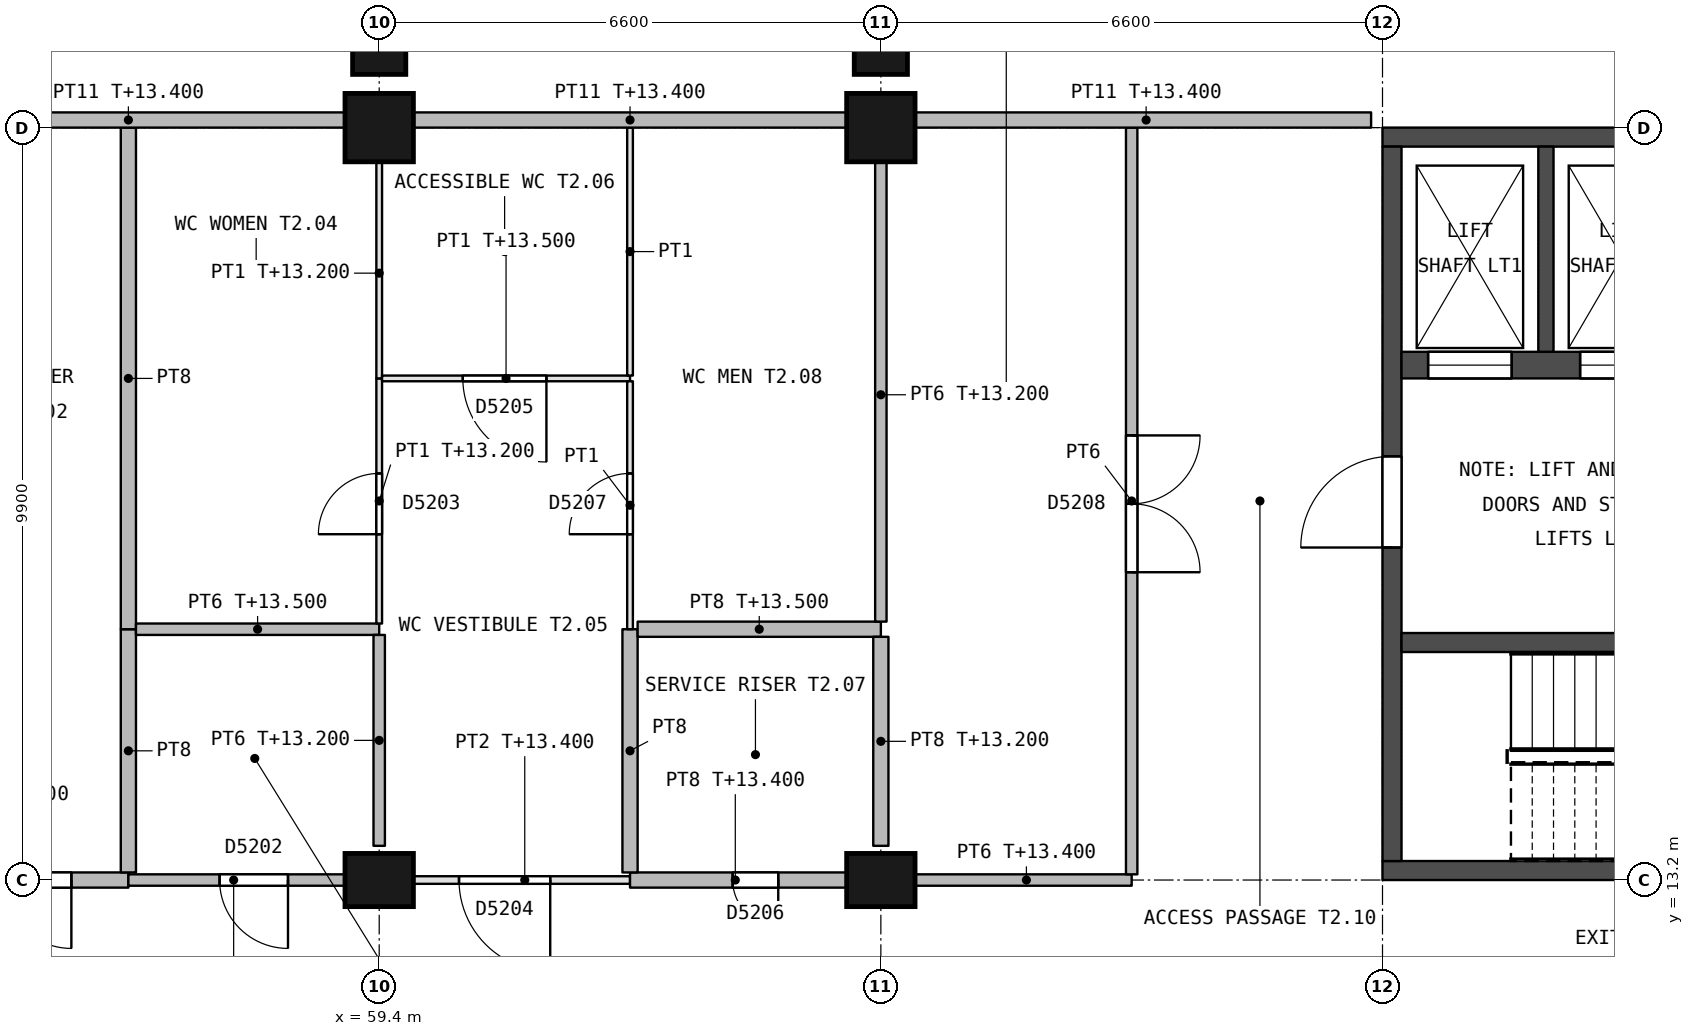
"""IFC4 building model, lengths in metres.
Left out: names, types, materials, properties, quantities, classifications, styles, units other than length and angle.
Written with IfcOpenShell. Run it as: python <this file> out.ifc"""

import sys

from ifc_helpers import new_model, si_unit, direction, frame, frame_2d, origin, origin_2d, place, context, subcontext, project, spatial, rectangle, extrude, element, fill, save


model = new_model("IFC4")
c1 = context("Model", 3, precision=1e-05, world=origin(), true_north=direction((0.0, 1.0)))
c2 = subcontext(c1, "Body", "Model", "MODEL_VIEW")
j1 = project(units=[si_unit("LENGTHUNIT", "METRE"), si_unit("PLANEANGLEUNIT", "RADIAN")], contexts=[c1])
p1 = place(None, origin())
s1 = spatial("IfcSite", under=j1, at=p1, CompositionType="ELEMENT")
p2 = place(p1, origin())
s2 = spatial("IfcBuilding", under=s1, at=p2, CompositionType="ELEMENT")
p3 = place(p2, frame((0.0, 0.0, 9.9)))
s3 = spatial("IfcBuildingStorey", under=s2, at=p3, CompositionType="ELEMENT", Elevation=9.9)
p4 = place(p3, frame((59.4, 13.2, 0.0), z_axis=(0.0, 0.0, 1.0), x_axis=(1.0, 0.0, 0.0)))
e1 = element("IfcColumn", 1, at=p4, inside=s3, PredefinedType="COLUMN", context=c2, shape_type="SweptSolid", body=[
    extrude(rectangle(XDim=0.9, YDim=0.7, at=origin_2d()), origin(), (0.0, 0.0, 1.0), 4.5),
])
p5 = place(p3, frame((59.4, 23.1, 0.0), z_axis=(0.0, 0.0, 1.0), x_axis=(1.0, 0.0, 0.0)))
e2 = element("IfcColumn", 2, at=p5, inside=s3, PredefinedType="COLUMN", context=c2, shape_type="SweptSolid", body=[
    extrude(rectangle(XDim=0.9, YDim=0.9, at=origin_2d()), origin(), (0.0, 0.0, 1.0), 4.5),
])
p6 = place(p3, frame((66.0, 13.2, 0.0), z_axis=(0.0, 0.0, 1.0), x_axis=(1.0, 0.0, 0.0)))
e3 = element("IfcColumn", 3, at=p6, inside=s3, PredefinedType="COLUMN", context=c2, shape_type="SweptSolid", body=[
    extrude(rectangle(XDim=0.9, YDim=0.7, at=origin_2d()), origin(), (0.0, 0.0, 1.0), 4.5),
])
p7 = place(p3, frame((66.0, 23.1, 0.0), z_axis=(0.0, 0.0, 1.0), x_axis=(1.0, 0.0, 0.0)))
e4 = element("IfcColumn", 4, at=p7, inside=s3, PredefinedType="COLUMN", context=c2, shape_type="SweptSolid", body=[
    extrude(rectangle(XDim=0.9, YDim=0.9, at=origin_2d()), origin(), (0.0, 0.0, 1.0), 4.5),
])
for number, where, z_axis, x_axis in (
    (5, (59.4, 24.15, 0.0), (0.0, 0.0, 1.0), (1.0, 0.0, 0.0)),
    (6, (66.0, 24.15, 0.0), (0.0, 0.0, 1.0), (1.0, 0.0, 0.0)),
):
    element("IfcColumn", number, at=place(p3, frame(where, z_axis=z_axis, x_axis=x_axis)), inside=s3, PredefinedType="COLUMN", context=c2, shape_type="SweptSolid", body=[
        extrude(rectangle(XDim=0.7, YDim=0.7, at=origin_2d()), origin(), (0.0, 0.0, 1.0), 4.5),
    ])
for number, where, z_axis, x_axis in (
    (7, (72.6, 13.325, 0.0), (0.0, 0.0, 1.0), (1.0, 0.0, 0.0)),
    (8, (72.6, 22.975, 0.0), (0.0, 0.0, 1.0), (1.0, 0.0, 0.0)),
):
    element("IfcWall", number, at=place(p3, frame(where, z_axis=z_axis, x_axis=x_axis)), inside=s3, PredefinedType="SHEAR", context=c2, shape_type="SweptSolid", body=[
        extrude(rectangle(XDim=6.6, YDim=0.25, at=frame_2d((3.3, 0.0))), origin(), (0.0, 0.0, 1.0), 4.2),
    ])
p8 = place(p3, frame((72.725, 13.45, 0.0), z_axis=(0.0, 0.0, 1.0), x_axis=(0.0, 1.0, 0.0)))
e9 = element("IfcWall", 9, at=p8, inside=s3, PredefinedType="SHEAR", context=c2, shape_type="SweptSolid", body=[
    extrude(rectangle(XDim=9.4, YDim=0.25, at=frame_2d((4.7, 0.0))), origin(), (0.0, 0.0, 1.0), 4.2),
])
p9 = place(p8, frame((4.125, 0.0, 0.0)))
e10 = element("IfcOpeningElement", 10, at=p9, cuts=e9, PredefinedType="OPENING", context=c2, shape_type="SweptSolid", body=[
    extrude(rectangle(XDim=1.2, YDim=2.1, at=frame_2d((0.6, 1.05))), frame((0.0, 0.135, 0.0), z_axis=(0.0, -1.0, 0.0), x_axis=(1.0, 0.0, 0.0)), (0.0, 0.0, 1.0), 0.27),
])
p10 = place(p3, frame((72.85, 16.325, 0.0), z_axis=(0.0, 0.0, 1.0), x_axis=(1.0, 0.0, 0.0)))
e11 = element("IfcWall", 11, at=p10, inside=s3, PredefinedType="SHEAR", context=c2, shape_type="SweptSolid", body=[
    extrude(rectangle(XDim=6.1, YDim=0.25, at=frame_2d((3.05, 0.0))), origin(), (0.0, 0.0, 1.0), 4.2),
])
p11 = place(p10, frame((4.95, 0.0, 0.0)))
e12 = element("IfcOpeningElement", 12, at=p11, cuts=e11, PredefinedType="OPENING", context=c2, shape_type="SweptSolid", body=[
    extrude(rectangle(XDim=1.0, YDim=2.2, at=frame_2d((0.5, 1.1))), frame((0.0, 0.135, 0.0), z_axis=(0.0, -1.0, 0.0), x_axis=(1.0, 0.0, 0.0)), (0.0, 0.0, 1.0), 0.27),
])
p12 = place(p3, frame((72.85, 19.975, 0.0), z_axis=(0.0, 0.0, 1.0), x_axis=(1.0, 0.0, 0.0)))
e13 = element("IfcWall", 13, at=p12, inside=s3, PredefinedType="SHEAR", context=c2, shape_type="SweptSolid", body=[
    extrude(rectangle(XDim=6.1, YDim=0.35, at=frame_2d((3.05, 0.0))), origin(), (0.0, 0.0, 1.0), 4.2),
])
p13 = place(p12, frame((0.35, 0.0, 0.0)))
e14 = element("IfcOpeningElement", 14, at=p13, cuts=e13, PredefinedType="OPENING", context=c2, shape_type="SweptSolid", body=[
    extrude(rectangle(XDim=1.1, YDim=2.2, at=frame_2d((0.55, 1.1))), frame((0.0, 0.185, 0.0), z_axis=(0.0, -1.0, 0.0), x_axis=(1.0, 0.0, 0.0)), (0.0, 0.0, 1.0), 0.37),
])
p14 = place(p12, frame((2.35, 0.0, 0.0)))
e15 = element("IfcOpeningElement", 15, at=p14, cuts=e13, PredefinedType="OPENING", context=c2, shape_type="SweptSolid", body=[
    extrude(rectangle(XDim=1.1, YDim=2.2, at=frame_2d((0.55, 1.1))), frame((0.0, 0.185, 0.0), z_axis=(0.0, -1.0, 0.0), x_axis=(1.0, 0.0, 0.0)), (0.0, 0.0, 1.0), 0.37),
])
p15 = place(p12, frame((4.45, 0.0, 0.0)))
e16 = element("IfcOpeningElement", 16, at=p15, cuts=e13, PredefinedType="OPENING", context=c2, shape_type="SweptSolid", body=[
    extrude(rectangle(XDim=1.2, YDim=2.3, at=frame_2d((0.6, 1.15))), frame((0.0, 0.185, 0.0), z_axis=(0.0, -1.0, 0.0), x_axis=(1.0, 0.0, 0.0)), (0.0, 0.0, 1.0), 0.37),
])
p16 = place(p3, frame((74.75, 20.15, 0.0), z_axis=(0.0, 0.0, 1.0), x_axis=(0.0, 1.0, 0.0)))
e17 = element("IfcWall", 17, at=p16, inside=s3, PredefinedType="SHEAR", context=c2, shape_type="SweptSolid", body=[
    extrude(rectangle(XDim=2.7, YDim=0.2, at=frame_2d((1.35, 0.0))), origin(), (0.0, 0.0, 1.0), 4.2),
])
p17 = place(p3, frame((56.1, 13.2, 0.0), z_axis=(0.0, 0.0, 1.0), x_axis=(-1.0, 0.0, 0.0)))
e18 = element("IfcWall", 18, at=p17, inside=s3, PredefinedType="PARTITIONING", context=c2, shape_type="SweptSolid", body=[
    extrude(rectangle(XDim=2.85, YDim=0.2, at=frame_2d((1.425, 0.0))), origin(), (0.0, 0.0, 1.0), 3.5),
])
p18 = place(p17, frame((0.75, 0.0, 0.0)))
e19 = element("IfcOpeningElement", 19, at=p18, cuts=e18, PredefinedType="OPENING", context=c2, shape_type="SweptSolid", body=[
    extrude(rectangle(XDim=1.8, YDim=2.4, at=frame_2d((0.9, 1.2))), frame((0.0, 0.11, 0.0), z_axis=(0.0, -1.0, 0.0), x_axis=(1.0, 0.0, 0.0)), (0.0, 0.0, 1.0), 0.22),
])
p19 = place(p3, frame((58.95, 13.2, 0.0), z_axis=(0.0, 0.0, 1.0), x_axis=(-1.0, 0.0, 0.0)))
e20 = element("IfcWall", 20, at=p19, inside=s3, PredefinedType="PARTITIONING", context=c2, shape_type="SweptSolid", body=[
    extrude(rectangle(XDim=2.85, YDim=0.15, at=frame_2d((1.425, 0.0))), origin(), (0.0, 0.0, 1.0), 3.5),
])
p20 = place(p19, frame((0.75, 0.0, 0.0)))
e21 = element("IfcOpeningElement", 21, at=p20, cuts=e20, PredefinedType="OPENING", context=c2, shape_type="SweptSolid", body=[
    extrude(rectangle(XDim=0.9, YDim=2.1, at=frame_2d((0.45, 1.05))), frame((0.0, 0.085, 0.0), z_axis=(0.0, -1.0, 0.0), x_axis=(1.0, 0.0, 0.0)), (0.0, 0.0, 1.0), 0.17),
])
p21 = place(p3, frame((59.85, 13.2, 0.0), z_axis=(0.0, 0.0, 1.0), x_axis=(1.0, 0.0, 0.0)))
e22 = element("IfcWall", 22, at=p21, inside=s3, PredefinedType="PARTITIONING", context=c2, shape_type="SweptSolid", body=[
    extrude(rectangle(XDim=2.85, YDim=0.1, at=frame_2d((1.425, 0.0))), origin(), (0.0, 0.0, 1.0), 3.5),
])
p22 = place(p21, frame((0.6, 0.0, 0.0)))
e23 = element("IfcOpeningElement", 23, at=p22, cuts=e22, PredefinedType="OPENING", context=c2, shape_type="SweptSolid", body=[
    extrude(rectangle(XDim=1.2, YDim=2.1, at=frame_2d((0.6, 1.05))), frame((0.0, 0.06, 0.0), z_axis=(0.0, -1.0, 0.0), x_axis=(1.0, 0.0, 0.0)), (0.0, 0.0, 1.0), 0.12),
])
p23 = place(p3, frame((62.7, 13.2, 0.0), z_axis=(0.0, 0.0, 1.0), x_axis=(1.0, 0.0, 0.0)))
e24 = element("IfcWall", 24, at=p23, inside=s3, PredefinedType="PARTITIONING", context=c2, shape_type="SweptSolid", body=[
    extrude(rectangle(XDim=2.85, YDim=0.2, at=frame_2d((1.425, 0.0))), origin(), (0.0, 0.0, 1.0), 3.5),
])
p24 = place(p23, frame((1.35, 0.0, 0.0)))
e25 = element("IfcOpeningElement", 25, at=p24, cuts=e24, PredefinedType="OPENING", context=c2, shape_type="SweptSolid", body=[
    extrude(rectangle(XDim=0.6, YDim=2.1, at=frame_2d((0.3, 1.05))), frame((0.0, 0.11, 0.0), z_axis=(0.0, -1.0, 0.0), x_axis=(1.0, 0.0, 0.0)), (0.0, 0.0, 1.0), 0.22),
])
p25 = place(p3, frame((69.3, 13.2, 0.0), z_axis=(0.0, 0.0, 1.0), x_axis=(-1.0, 0.0, 0.0)))
e26 = element("IfcWall", 26, at=p25, inside=s3, PredefinedType="PARTITIONING", context=c2, shape_type="SweptSolid", body=[
    extrude(rectangle(XDim=2.85, YDim=0.15, at=frame_2d((1.425, 0.0))), origin(), (0.0, 0.0, 1.0), 3.5),
])
p26 = place(p3, frame((56.1, 13.3, 0.0), z_axis=(0.0, 0.0, 1.0), x_axis=(0.0, 1.0, 0.0)))
e27 = element("IfcWall", 27, at=p26, inside=s3, PredefinedType="PARTITIONING", context=c2, shape_type="SweptSolid", body=[
    extrude(rectangle(XDim=3.2, YDim=0.2, at=frame_2d((1.6, 0.0))), origin(), (0.0, 0.0, 1.0), 4.2),
])
p27 = place(p3, frame((56.1, 16.5, 0.0), z_axis=(0.0, 0.0, 1.0), x_axis=(0.0, 1.0, 0.0)))
e28 = element("IfcWall", 28, at=p27, inside=s3, PredefinedType="PARTITIONING", context=c2, shape_type="SweptSolid", body=[
    extrude(rectangle(XDim=6.6, YDim=0.2, at=frame_2d((3.3, 0.0))), origin(), (0.0, 0.0, 1.0), 4.2),
])
p28 = place(p3, frame((59.4, 16.5, 0.0), z_axis=(0.0, 0.0, 1.0), x_axis=(-1.0, 0.0, 0.0)))
e29 = element("IfcWall", 29, at=p28, inside=s3, PredefinedType="PARTITIONING", context=c2, shape_type="SweptSolid", body=[
    extrude(rectangle(XDim=3.2, YDim=0.15, at=frame_2d((1.6, 0.0))), origin(), (0.0, 0.0, 1.0), 3.6),
])
p29 = place(p3, frame((59.4, 13.65, 0.0), z_axis=(0.0, 0.0, 1.0), x_axis=(0.0, 1.0, 0.0)))
e30 = element("IfcWall", 30, at=p29, inside=s3, PredefinedType="PARTITIONING", context=c2, shape_type="SweptSolid", body=[
    extrude(rectangle(XDim=2.775, YDim=0.15, at=frame_2d((1.388, 0.0))), origin(), (0.0, 0.0, 1.0), 3.3),
])
p30 = place(p3, frame((59.4, 16.575, 0.0), z_axis=(0.0, 0.0, 1.0), x_axis=(0.0, 1.0, 0.0)))
e31 = element("IfcWall", 31, at=p30, inside=s3, PredefinedType="PARTITIONING", context=c2, shape_type="SweptSolid", body=[
    extrude(rectangle(XDim=3.225, YDim=0.075, at=frame_2d((1.613, 0.0))), origin(), (0.0, 0.0, 1.0), 3.3),
])
p31 = place(p30, frame((1.175, 0.0, 0.0)))
e32 = element("IfcOpeningElement", 32, at=p31, cuts=e31, PredefinedType="OPENING", context=c2, shape_type="SweptSolid", body=[
    extrude(rectangle(XDim=0.8, YDim=2.1, at=frame_2d((0.4, 1.05))), frame((0.0, 0.047, 0.0), z_axis=(0.0, -1.0, 0.0), x_axis=(1.0, 0.0, 0.0)), (0.0, 0.0, 1.0), 0.095),
])
p32 = place(p3, frame((59.4, 19.8, 0.0), z_axis=(0.0, 0.0, 1.0), x_axis=(0.0, 1.0, 0.0)))
e33 = element("IfcWall", 33, at=p32, inside=s3, PredefinedType="PARTITIONING", context=c2, shape_type="SweptSolid", body=[
    extrude(rectangle(XDim=2.85, YDim=0.075, at=frame_2d((1.425, 0.0))), origin(), (0.0, 0.0, 1.0), 3.3),
])
p33 = place(p3, frame((59.438, 19.8, 0.0), z_axis=(0.0, 0.0, 1.0), x_axis=(1.0, 0.0, 0.0)))
e34 = element("IfcWall", 34, at=p33, inside=s3, PredefinedType="PARTITIONING", context=c2, shape_type="SweptSolid", body=[
    extrude(rectangle(XDim=3.262, YDim=0.075, at=frame_2d((1.631, 0.0))), origin(), (0.0, 0.0, 1.0), 3.6),
])
p34 = place(p33, frame((1.062, 0.0, 0.0)))
e35 = element("IfcOpeningElement", 35, at=p34, cuts=e34, PredefinedType="OPENING", context=c2, shape_type="SweptSolid", body=[
    extrude(rectangle(XDim=1.1, YDim=2.1, at=frame_2d((0.55, 1.05))), frame((0.0, 0.047, 0.0), z_axis=(0.0, -1.0, 0.0), x_axis=(1.0, 0.0, 0.0)), (0.0, 0.0, 1.0), 0.095),
])
p35 = place(p3, frame((62.7, 13.3, 0.0), z_axis=(0.0, 0.0, 1.0), x_axis=(0.0, 1.0, 0.0)))
e36 = element("IfcWall", 36, at=p35, inside=s3, PredefinedType="PARTITIONING", context=c2, shape_type="SweptSolid", body=[
    extrude(rectangle(XDim=3.2, YDim=0.2, at=frame_2d((1.6, 0.0))), origin(), (0.0, 0.0, 1.0), 4.2),
])
p36 = place(p3, frame((62.7, 19.762, 0.0), z_axis=(0.0, 0.0, 1.0), x_axis=(0.0, -1.0, 0.0)))
e37 = element("IfcWall", 37, at=p36, inside=s3, PredefinedType="PARTITIONING", context=c2, shape_type="SweptSolid", body=[
    extrude(rectangle(XDim=3.262, YDim=0.075, at=frame_2d((1.631, 0.0))), origin(), (0.0, 0.0, 1.0), 4.2),
])
p37 = place(p36, frame((1.212, 0.0, 0.0)))
e38 = element("IfcOpeningElement", 38, at=p37, cuts=e37, PredefinedType="OPENING", context=c2, shape_type="SweptSolid", body=[
    extrude(rectangle(XDim=0.8, YDim=2.1, at=frame_2d((0.4, 1.05))), frame((0.0, 0.047, 0.0), z_axis=(0.0, -1.0, 0.0), x_axis=(1.0, 0.0, 0.0)), (0.0, 0.0, 1.0), 0.095),
])
p38 = place(p3, frame((62.7, 19.837, 0.0), z_axis=(0.0, 0.0, 1.0), x_axis=(0.0, 1.0, 0.0)))
e39 = element("IfcWall", 39, at=p38, inside=s3, PredefinedType="PARTITIONING", context=c2, shape_type="SweptSolid", body=[
    extrude(rectangle(XDim=3.263, YDim=0.075, at=frame_2d((1.631, 0.0))), origin(), (0.0, 0.0, 1.0), 4.2),
])
p39 = place(p3, frame((66.0, 16.5, 0.0), z_axis=(0.0, 0.0, 1.0), x_axis=(-1.0, 0.0, 0.0)))
e40 = element("IfcWall", 40, at=p39, inside=s3, PredefinedType="PARTITIONING", context=c2, shape_type="SweptSolid", body=[
    extrude(rectangle(XDim=3.2, YDim=0.2, at=frame_2d((1.6, 0.0))), origin(), (0.0, 0.0, 1.0), 3.6),
])
p40 = place(p3, frame((66.0, 13.65, 0.0), z_axis=(0.0, 0.0, 1.0), x_axis=(0.0, 1.0, 0.0)))
e41 = element("IfcWall", 41, at=p40, inside=s3, PredefinedType="PARTITIONING", context=c2, shape_type="SweptSolid", body=[
    extrude(rectangle(XDim=2.75, YDim=0.2, at=frame_2d((1.375, 0.0))), origin(), (0.0, 0.0, 1.0), 3.3),
])
p41 = place(p3, frame((66.0, 16.6, 0.0), z_axis=(0.0, 0.0, 1.0), x_axis=(0.0, 1.0, 0.0)))
e42 = element("IfcWall", 42, at=p41, inside=s3, PredefinedType="PARTITIONING", context=c2, shape_type="SweptSolid", body=[
    extrude(rectangle(XDim=6.05, YDim=0.15, at=frame_2d((3.025, 0.0))), origin(), (0.0, 0.0, 1.0), 3.3),
])
p42 = place(p3, frame((69.3, 23.1, 0.0), z_axis=(0.0, 0.0, 1.0), x_axis=(0.0, -1.0, 0.0)))
e43 = element("IfcWall", 43, at=p42, inside=s3, PredefinedType="PARTITIONING", context=c2, shape_type="SweptSolid", body=[
    extrude(rectangle(XDim=9.825, YDim=0.15, at=frame_2d((4.913, 0.0))), origin(), (0.0, 0.0, 1.0), 4.2),
])
p43 = place(p42, frame((4.05, 0.0, 0.0)))
e44 = element("IfcOpeningElement", 44, at=p43, cuts=e43, PredefinedType="OPENING", context=c2, shape_type="SweptSolid", body=[
    extrude(rectangle(XDim=1.8, YDim=2.4, at=frame_2d((0.9, 1.2))), frame((0.0, 0.085, 0.0), z_axis=(0.0, -1.0, 0.0), x_axis=(1.0, 0.0, 0.0)), (0.0, 0.0, 1.0), 0.17),
])
for number, where, z_axis, x_axis in (
    (45, (53.25, 23.2, 0.0), (0.0, 0.0, 1.0), (1.0, 0.0, 0.0)),
    (46, (59.85, 23.2, 0.0), (0.0, 0.0, 1.0), (1.0, 0.0, 0.0)),
):
    element("IfcWall", number, at=place(p3, frame(where, z_axis=z_axis, x_axis=x_axis)), inside=s3, PredefinedType="PARTITIONING", context=c2, shape_type="SweptSolid", body=[
        extrude(rectangle(XDim=5.7, YDim=0.2, at=frame_2d((2.85, 0.0))), origin(), (0.0, 0.0, 1.0), 3.5),
    ])
p44 = place(p3, frame((66.45, 23.2, 0.0), z_axis=(0.0, 0.0, 1.0), x_axis=(1.0, 0.0, 0.0)))
e47 = element("IfcWall", 47, at=p44, inside=s3, PredefinedType="PARTITIONING", context=c2, shape_type="SweptSolid", body=[
    extrude(rectangle(XDim=6.0, YDim=0.2, at=frame_2d((3.0, 0.0))), origin(), (0.0, 0.0, 1.0), 3.5),
])
p45 = place(p9, origin())
e48 = element("IfcDoor", 48, at=p45, inside=s3, OperationType="SINGLE_SWING_LEFT", PredefinedType="DOOR", context=c2, shape_type="SweptSolid", body=[
    extrude(rectangle(XDim=1.2, YDim=2.1, at=frame_2d((0.6, 1.05))), frame((0.0, 0.025, 0.0), z_axis=(0.0, -1.0, 0.0), x_axis=(1.0, 0.0, 0.0)), (0.0, 0.0, 1.0), 0.05),
])
fill(e10, e48)
p46 = place(p13, origin())
e49 = element("IfcDoor", 49, at=p46, inside=s3, OperationType="DOUBLE_DOOR_SLIDING", PredefinedType="NOTDEFINED", context=c2, shape_type="SweptSolid", body=[
    extrude(rectangle(XDim=1.1, YDim=2.2, at=frame_2d((0.55, 1.1))), frame((0.0, 0.025, 0.0), z_axis=(0.0, -1.0, 0.0), x_axis=(1.0, 0.0, 0.0)), (0.0, 0.0, 1.0), 0.05),
])
fill(e14, e49)
p47 = place(p14, origin())
e50 = element("IfcDoor", 50, at=p47, inside=s3, OperationType="DOUBLE_DOOR_SLIDING", PredefinedType="NOTDEFINED", context=c2, shape_type="SweptSolid", body=[
    extrude(rectangle(XDim=1.1, YDim=2.2, at=frame_2d((0.55, 1.1))), frame((0.0, 0.025, 0.0), z_axis=(0.0, -1.0, 0.0), x_axis=(1.0, 0.0, 0.0)), (0.0, 0.0, 1.0), 0.05),
])
fill(e15, e50)
p48 = place(p18, origin())
e51 = element("IfcDoor", 51, at=p48, inside=s3, OperationType="DOUBLE_DOOR_SINGLE_SWING", PredefinedType="DOOR", context=c2, shape_type="SweptSolid", body=[
    extrude(rectangle(XDim=1.8, YDim=2.4, at=frame_2d((0.9, 1.2))), frame((0.0, 0.03, 0.0), z_axis=(0.0, -1.0, 0.0), x_axis=(1.0, 0.0, 0.0)), (0.0, 0.0, 1.0), 0.06),
])
fill(e19, e51)
p49 = place(p20, origin())
e52 = element("IfcDoor", 52, at=p49, inside=s3, OperationType="SINGLE_SWING_LEFT", PredefinedType="DOOR", context=c2, shape_type="SweptSolid", body=[
    extrude(rectangle(XDim=0.9, YDim=2.1, at=frame_2d((0.45, 1.05))), frame((0.0, 0.027, 0.0), z_axis=(0.0, -1.0, 0.0), x_axis=(1.0, 0.0, 0.0)), (0.0, 0.0, 1.0), 0.054),
])
fill(e21, e52)
p50 = place(p31, origin())
e53 = element("IfcDoor", 53, at=p50, inside=s3, OperationType="SINGLE_SWING_LEFT", PredefinedType="DOOR", context=c2, shape_type="SweptSolid", body=[
    extrude(rectangle(XDim=0.8, YDim=2.1, at=frame_2d((0.4, 1.05))), frame((0.0, 0.022, 0.0), z_axis=(0.0, -1.0, 0.0), x_axis=(1.0, 0.0, 0.0)), (0.0, 0.0, 1.0), 0.044),
])
fill(e32, e53)
p51 = place(p22, origin())
e54 = element("IfcDoor", 54, at=p51, inside=s3, OperationType="SINGLE_SWING_RIGHT", PredefinedType="DOOR", context=c2, shape_type="SweptSolid", body=[
    extrude(rectangle(XDim=1.2, YDim=2.1, at=frame_2d((0.6, 1.05))), frame((0.0, 0.022, 0.0), z_axis=(0.0, -1.0, 0.0), x_axis=(1.0, 0.0, 0.0)), (0.0, 0.0, 1.0), 0.044),
])
fill(e23, e54)
p52 = place(p34, origin())
e55 = element("IfcDoor", 55, at=p52, inside=s3, OperationType="SINGLE_SWING_RIGHT", PredefinedType="DOOR", context=c2, shape_type="SweptSolid", body=[
    extrude(rectangle(XDim=1.1, YDim=2.1, at=frame_2d((0.55, 1.05))), frame((0.0, 0.022, 0.0), z_axis=(0.0, -1.0, 0.0), x_axis=(1.0, 0.0, 0.0)), (0.0, 0.0, 1.0), 0.044),
])
fill(e35, e55)
p53 = place(p24, origin())
e56 = element("IfcDoor", 56, at=p53, inside=s3, OperationType="SINGLE_SWING_RIGHT", PredefinedType="DOOR", context=c2, shape_type="SweptSolid", body=[
    extrude(rectangle(XDim=0.6, YDim=2.1, at=frame_2d((0.3, 1.05))), frame((0.0, 0.03, 0.0), z_axis=(0.0, -1.0, 0.0), x_axis=(1.0, 0.0, 0.0)), (0.0, 0.0, 1.0), 0.06),
])
fill(e25, e56)
p54 = place(p37, origin())
e57 = element("IfcDoor", 57, at=p54, inside=s3, OperationType="SINGLE_SWING_RIGHT", PredefinedType="DOOR", context=c2, shape_type="SweptSolid", body=[
    extrude(rectangle(XDim=0.8, YDim=2.1, at=frame_2d((0.4, 1.05))), frame((0.0, 0.022, 0.0), z_axis=(0.0, -1.0, 0.0), x_axis=(1.0, 0.0, 0.0)), (0.0, 0.0, 1.0), 0.044),
])
fill(e38, e57)
p55 = place(p43, origin())
e58 = element("IfcDoor", 58, at=p55, inside=s3, OperationType="DOUBLE_DOOR_SINGLE_SWING", PredefinedType="DOOR", context=c2, shape_type="SweptSolid", body=[
    extrude(rectangle(XDim=1.8, YDim=2.4, at=frame_2d((0.9, 1.2))), frame((0.0, 0.027, 0.0), z_axis=(0.0, -1.0, 0.0), x_axis=(1.0, 0.0, 0.0)), (0.0, 0.0, 1.0), 0.054),
])
fill(e44, e58)
save(model, sys.argv[1])
